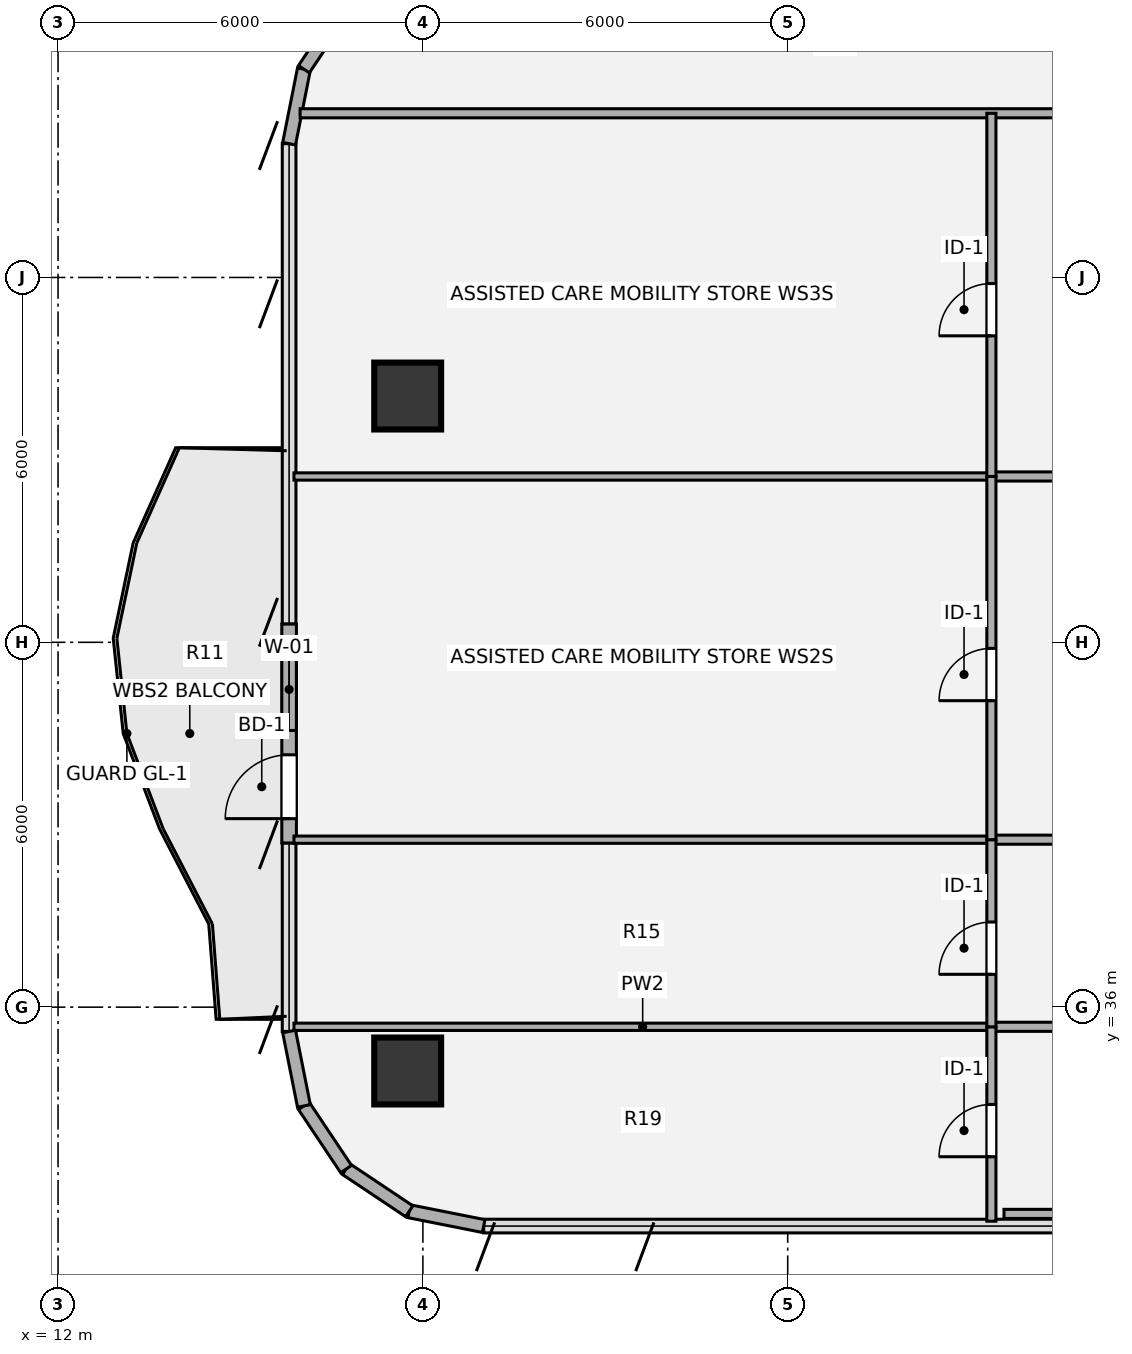
"""IFC4 building model, lengths in metres.
Left out: names, types, materials, properties, quantities, classifications, styles, units other than length and angle.
Written with IfcOpenShell. Run it as: python <this file> out.ifc"""

import sys

from ifc_helpers import new_model, si_unit, direction, frame, frame_2d, origin, origin_2d, place, context, subcontext, project, spatial, rectangle, hollow_circle, extrude, source, transform, mapped, element, fill, save


model = new_model("IFC4")
c1 = context("Model", 3, precision=1e-05, world=origin(), true_north=direction((0.0, 1.0)))
c2 = subcontext(c1, "Body", "Model", "MODEL_VIEW")
j1 = project(units=[si_unit("LENGTHUNIT", "METRE"), si_unit("PLANEANGLEUNIT", "RADIAN")], contexts=[c1])
p1 = place(None, origin())
s1 = spatial("IfcSite", under=j1, at=p1, CompositionType="ELEMENT")
p2 = place(p1, origin())
s2 = spatial("IfcBuilding", under=s1, at=p2, CompositionType="ELEMENT")
p3 = place(p2, frame((0.0, 0.0, 167.76)))
s3 = spatial("IfcBuildingStorey", under=s2, at=p3, CompositionType="ELEMENT", Elevation=167.76)
m1 = source(origin(), c2, "Body", "SweptSolid", [
    extrude(hollow_circle(Radius=0.55, WallThickness=0.04, at=origin_2d()), origin(), (0.0, 0.0, 1.0), 3.78),
])
for number, where, z_axis, x_axis in (
    (1, (17.75, 34.95, 0.0), (0.0, 0.0, 1.0), (1.0, 0.0, 0.0)),
    (2, (17.75, 46.05, 0.0), (0.0, 0.0, 1.0), (1.0, 0.0, 0.0)),
):
    element("IfcColumn", number, at=place(p3, frame(where, z_axis=z_axis, x_axis=x_axis)), inside=s3, PredefinedType="COLUMN", context=c2, shape_type="MappedRepresentation", body=[
        mapped(m1, transform((0.0, 0.0, 0.0), x_axis=(1.0, 0.0, 0.0), y_axis=(0.0, 1.0, 0.0), z_axis=(0.0, 0.0, 1.0), scale=1.0)),
    ])
for number, where, z_axis, x_axis in (
    (3, (19.0, 32.4, 0.0), (0.0, 0.0, 1.0), (-0.981, 0.195, 0.0)),
    (4, (17.775, 32.644, 0.0), (0.0, 0.0, 1.0), (-0.831, 0.556, 0.0)),
    (5, (16.737, 33.337, 0.0), (0.0, 0.0, 1.0), (-0.556, 0.831, 0.0)),
    (6, (16.044, 34.375, 0.0), (0.0, 0.0, 1.0), (-0.195, 0.981, 0.0)),
):
    element("IfcWall", number, at=place(p3, frame(where, z_axis=z_axis, x_axis=x_axis)), inside=s3, PredefinedType="SOLIDWALL", context=c2, shape_type="SweptSolid", body=[
        extrude(rectangle(XDim=1.249, YDim=0.215, at=frame_2d((0.624, 0.0))), origin(), (0.0, 0.0, 1.0), 3.53),
    ])
p4 = place(p3, frame((15.8, 38.7, 0.0), z_axis=(0.0, 0.0, 1.0), x_axis=(0.0, 1.0, 0.0)))
e7 = element("IfcWall", 7, at=p4, inside=s3, PredefinedType="SOLIDWALL", context=c2, shape_type="SweptSolid", body=[
    extrude(rectangle(XDim=3.6, YDim=0.24, at=frame_2d((1.8, 0.0))), origin(), (0.0, 0.0, 1.0), 3.53),
])
p5 = place(p4, frame((0.4, 0.0, 0.0)))
e8 = element("IfcOpeningElement", 8, at=p5, cuts=e7, PredefinedType="OPENING", context=c2, shape_type="SweptSolid", body=[
    extrude(rectangle(XDim=1.05, YDim=2.15, at=origin_2d()), frame((0.525, 0.13, 1.075), z_axis=(0.0, -1.0, 0.0), x_axis=(1.0, 0.0, 0.0)), (0.0, 0.0, 1.0), 0.26),
])
p6 = place(p4, frame((1.85, 0.0, 0.85)))
e9 = element("IfcOpeningElement", 9, at=p6, cuts=e7, PredefinedType="OPENING", context=c2, shape_type="SweptSolid", body=[
    extrude(rectangle(XDim=1.35, YDim=1.35, at=origin_2d()), frame((0.675, 0.13, 0.675), z_axis=(0.0, -1.0, 0.0), x_axis=(1.0, 0.0, 0.0)), (0.0, 0.0, 1.0), 0.26),
])
for number, where, z_axis, x_axis in (
    (10, (15.8, 50.2, 0.0), (0.0, 0.0, 1.0), (0.195, 0.981, 0.0)),
    (11, (16.044, 51.425, 0.0), (0.0, 0.0, 1.0), (0.556, 0.831, 0.0)),
):
    element("IfcWall", number, at=place(p3, frame(where, z_axis=z_axis, x_axis=x_axis)), inside=s3, PredefinedType="SOLIDWALL", context=c2, shape_type="SweptSolid", body=[
        extrude(rectangle(XDim=1.249, YDim=0.215, at=frame_2d((0.624, 0.0))), origin(), (0.0, 0.0, 1.0), 3.53),
    ])
p7 = place(p3, frame((27.557, 32.6, 0.0), z_axis=(0.0, 0.0, 1.0), x_axis=(1.0, 0.0, 0.0)))
e12 = element("IfcWall", 12, at=p7, inside=s3, PredefinedType="PARTITIONING", context=c2, shape_type="SweptSolid", body=[
    extrude(rectangle(XDim=5.993, YDim=0.15, at=frame_2d((2.997, 0.0))), origin(), (0.0, 0.0, 1.0), 3.5),
])
p8 = place(p3, frame((15.88, 35.677, 0.0), z_axis=(0.0, 0.0, 1.0), x_axis=(1.0, 0.0, 0.0)))
e13 = element("IfcWall", 13, at=p8, inside=s3, PredefinedType="PARTITIONING", context=c2, shape_type="SweptSolid", body=[
    extrude(rectangle(XDim=11.47, YDim=0.12, at=frame_2d((5.735, 0.0))), origin(), (0.0, 0.0, 1.0), 2.982),
])
p9 = place(p3, frame((27.35, 35.677, 0.0), z_axis=(0.0, 0.0, 1.0), x_axis=(1.0, 0.0, 0.0)))
e14 = element("IfcWall", 14, at=p9, inside=s3, PredefinedType="PARTITIONING", context=c2, shape_type="SweptSolid", body=[
    extrude(rectangle(XDim=6.2, YDim=0.15, at=frame_2d((3.1, 0.0))), origin(), (0.0, 0.0, 1.0), 2.982),
])
p10 = place(p3, frame((15.88, 38.754, 0.0), z_axis=(0.0, 0.0, 1.0), x_axis=(1.0, 0.0, 0.0)))
e15 = element("IfcWall", 15, at=p10, inside=s3, PredefinedType="PARTITIONING", context=c2, shape_type="SweptSolid", body=[
    extrude(rectangle(XDim=11.47, YDim=0.12, at=frame_2d((5.735, 0.0))), origin(), (0.0, 0.0, 1.0), 2.982),
])
p11 = place(p3, frame((27.35, 38.754, 0.0), z_axis=(0.0, 0.0, 1.0), x_axis=(1.0, 0.0, 0.0)))
e16 = element("IfcWall", 16, at=p11, inside=s3, PredefinedType="PARTITIONING", context=c2, shape_type="SweptSolid", body=[
    extrude(rectangle(XDim=6.2, YDim=0.15, at=frame_2d((3.1, 0.0))), origin(), (0.0, 0.0, 1.0), 2.982),
])
p12 = place(p3, frame((15.88, 44.727, 0.0), z_axis=(0.0, 0.0, 1.0), x_axis=(1.0, 0.0, 0.0)))
e17 = element("IfcWall", 17, at=p12, inside=s3, PredefinedType="PARTITIONING", context=c2, shape_type="SweptSolid", body=[
    extrude(rectangle(XDim=11.47, YDim=0.12, at=frame_2d((5.735, 0.0))), origin(), (0.0, 0.0, 1.0), 3.055),
])
p13 = place(p3, frame((27.35, 44.727, 0.0), z_axis=(0.0, 0.0, 1.0), x_axis=(1.0, 0.0, 0.0)))
e18 = element("IfcWall", 18, at=p13, inside=s3, PredefinedType="PARTITIONING", context=c2, shape_type="SweptSolid", body=[
    extrude(rectangle(XDim=6.2, YDim=0.15, at=frame_2d((3.1, 0.0))), origin(), (0.0, 0.0, 1.0), 3.055),
])
p14 = place(p3, frame((15.981, 50.7, 0.0), z_axis=(0.0, 0.0, 1.0), x_axis=(1.0, 0.0, 0.0)))
e19 = element("IfcWall", 19, at=p14, inside=s3, PredefinedType="PARTITIONING", context=c2, shape_type="SweptSolid", body=[
    extrude(rectangle(XDim=17.569, YDim=0.15, at=frame_2d((8.785, 0.0))), origin(), (0.0, 0.0, 1.0), 3.308),
])
p15 = place(p3, frame((27.35, 32.48, 0.0), z_axis=(0.0, 0.0, 1.0), x_axis=(0.0, 1.0, 0.0)))
e20 = element("IfcWall", 20, at=p15, inside=s3, PredefinedType="PARTITIONING", context=c2, shape_type="SweptSolid", body=[
    extrude(rectangle(XDim=3.197, YDim=0.15, at=frame_2d((1.599, 0.0))), origin(), (0.0, 0.0, 1.0), 3.5),
])
p16 = place(p15, frame((1.06, 0.0, 0.0)))
e21 = element("IfcOpeningElement", 21, at=p16, cuts=e20, PredefinedType="OPENING", context=c2, shape_type="SweptSolid", body=[
    extrude(rectangle(XDim=0.86, YDim=2.1, at=origin_2d()), frame((0.43, 0.085, 1.05), z_axis=(0.0, -1.0, 0.0), x_axis=(1.0, 0.0, 0.0)), (0.0, 0.0, 1.0), 0.17),
])
p17 = place(p3, frame((27.35, 35.677, 0.0), z_axis=(0.0, 0.0, 1.0), x_axis=(0.0, 1.0, 0.0)))
e22 = element("IfcWall", 22, at=p17, inside=s3, PredefinedType="PARTITIONING", context=c2, shape_type="SweptSolid", body=[
    extrude(rectangle(XDim=3.077, YDim=0.15, at=frame_2d((1.539, 0.0))), origin(), (0.0, 0.0, 1.0), 3.5),
])
p18 = place(p17, frame((0.863, 0.0, 0.0)))
e23 = element("IfcOpeningElement", 23, at=p18, cuts=e22, PredefinedType="OPENING", context=c2, shape_type="SweptSolid", body=[
    extrude(rectangle(XDim=0.86, YDim=2.1, at=origin_2d()), frame((0.43, 0.085, 1.05), z_axis=(0.0, -1.0, 0.0), x_axis=(1.0, 0.0, 0.0)), (0.0, 0.0, 1.0), 0.17),
])
p19 = place(p3, frame((27.35, 38.754, 0.0), z_axis=(0.0, 0.0, 1.0), x_axis=(0.0, 1.0, 0.0)))
e24 = element("IfcWall", 24, at=p19, inside=s3, PredefinedType="PARTITIONING", context=c2, shape_type="SweptSolid", body=[
    extrude(rectangle(XDim=5.973, YDim=0.15, at=frame_2d((2.987, 0.0))), origin(), (0.0, 0.0, 1.0), 3.5),
])
p20 = place(p19, frame((2.286, 0.0, 0.0)))
e25 = element("IfcOpeningElement", 25, at=p20, cuts=e24, PredefinedType="OPENING", context=c2, shape_type="SweptSolid", body=[
    extrude(rectangle(XDim=0.86, YDim=2.1, at=origin_2d()), frame((0.43, 0.085, 1.05), z_axis=(0.0, -1.0, 0.0), x_axis=(1.0, 0.0, 0.0)), (0.0, 0.0, 1.0), 0.17),
])
p21 = place(p3, frame((27.35, 44.727, 0.0), z_axis=(0.0, 0.0, 1.0), x_axis=(0.0, 1.0, 0.0)))
e26 = element("IfcWall", 26, at=p21, inside=s3, PredefinedType="PARTITIONING", context=c2, shape_type="SweptSolid", body=[
    extrude(rectangle(XDim=5.973, YDim=0.15, at=frame_2d((2.986, 0.0))), origin(), (0.0, 0.0, 1.0), 3.5),
])
p22 = place(p21, frame((2.313, 0.0, 0.0)))
e27 = element("IfcOpeningElement", 27, at=p22, cuts=e26, PredefinedType="OPENING", context=c2, shape_type="SweptSolid", body=[
    extrude(rectangle(XDim=0.86, YDim=2.1, at=origin_2d()), frame((0.43, 0.085, 1.05), z_axis=(0.0, -1.0, 0.0), x_axis=(1.0, 0.0, 0.0)), (0.0, 0.0, 1.0), 0.17),
])
m2 = source(origin(), c2, "Body", "SweptSolid", [
    extrude(rectangle(XDim=1.05, YDim=2.15, at=origin_2d()), frame((0.525, 0.025, 1.075), z_axis=(0.0, -1.0, 0.0), x_axis=(1.0, 0.0, 0.0)), (0.0, 0.0, 1.0), 0.05),
])
p23 = place(p5, origin())
e28 = element("IfcDoor", 28, at=p23, inside=s3, OperationType="SINGLE_SWING_LEFT", PredefinedType="DOOR", context=c2, shape_type="MappedRepresentation", body=[
    mapped(m2, transform((0.0, 0.0, 0.0), x_axis=(1.0, 0.0, 0.0), y_axis=(0.0, 1.0, 0.0), z_axis=(0.0, 0.0, 1.0), scale=1.0)),
])
fill(e8, e28)
m3 = source(origin(), c2, "Body", "SweptSolid", [
    extrude(rectangle(XDim=1.35, YDim=1.35, at=origin_2d()), frame((0.675, 0.03, 0.675), z_axis=(0.0, -1.0, 0.0), x_axis=(1.0, 0.0, 0.0)), (0.0, 0.0, 1.0), 0.06),
])
p24 = place(p6, origin())
e29 = element("IfcWindow", 29, at=p24, inside=s3, PartitioningType="SINGLE_PANEL", PredefinedType="WINDOW", context=c2, shape_type="MappedRepresentation", body=[
    mapped(m3, transform((0.0, 0.0, 0.0), x_axis=(1.0, 0.0, 0.0), y_axis=(0.0, 1.0, 0.0), z_axis=(0.0, 0.0, 1.0), scale=1.0)),
])
fill(e9, e29)
m4 = source(origin(), c2, "Body", "SweptSolid", [
    extrude(rectangle(XDim=0.86, YDim=2.1, at=origin_2d()), frame((0.43, 0.025, 1.05), z_axis=(0.0, -1.0, 0.0), x_axis=(1.0, 0.0, 0.0)), (0.0, 0.0, 1.0), 0.05),
])
p25 = place(p16, origin())
e30 = element("IfcDoor", 30, at=p25, inside=s3, OperationType="SINGLE_SWING_LEFT", PredefinedType="DOOR", context=c2, shape_type="MappedRepresentation", body=[
    mapped(m4, transform((0.0, 0.0, 0.0), x_axis=(1.0, 0.0, 0.0), y_axis=(0.0, 1.0, 0.0), z_axis=(0.0, 0.0, 1.0), scale=1.0)),
])
fill(e21, e30)
p26 = place(p18, origin())
e31 = element("IfcDoor", 31, at=p26, inside=s3, OperationType="SINGLE_SWING_LEFT", PredefinedType="DOOR", context=c2, shape_type="MappedRepresentation", body=[
    mapped(m4, transform((0.0, 0.0, 0.0), x_axis=(1.0, 0.0, 0.0), y_axis=(0.0, 1.0, 0.0), z_axis=(0.0, 0.0, 1.0), scale=1.0)),
])
fill(e23, e31)
p27 = place(p20, origin())
e32 = element("IfcDoor", 32, at=p27, inside=s3, OperationType="SINGLE_SWING_LEFT", PredefinedType="DOOR", context=c2, shape_type="MappedRepresentation", body=[
    mapped(m4, transform((0.0, 0.0, 0.0), x_axis=(1.0, 0.0, 0.0), y_axis=(0.0, 1.0, 0.0), z_axis=(0.0, 0.0, 1.0), scale=1.0)),
])
fill(e25, e32)
p28 = place(p22, origin())
e33 = element("IfcDoor", 33, at=p28, inside=s3, OperationType="SINGLE_SWING_LEFT", PredefinedType="DOOR", context=c2, shape_type="MappedRepresentation", body=[
    mapped(m4, transform((0.0, 0.0, 0.0), x_axis=(1.0, 0.0, 0.0), y_axis=(0.0, 1.0, 0.0), z_axis=(0.0, 0.0, 1.0), scale=1.0)),
])
fill(e27, e33)
save(model, sys.argv[1])
